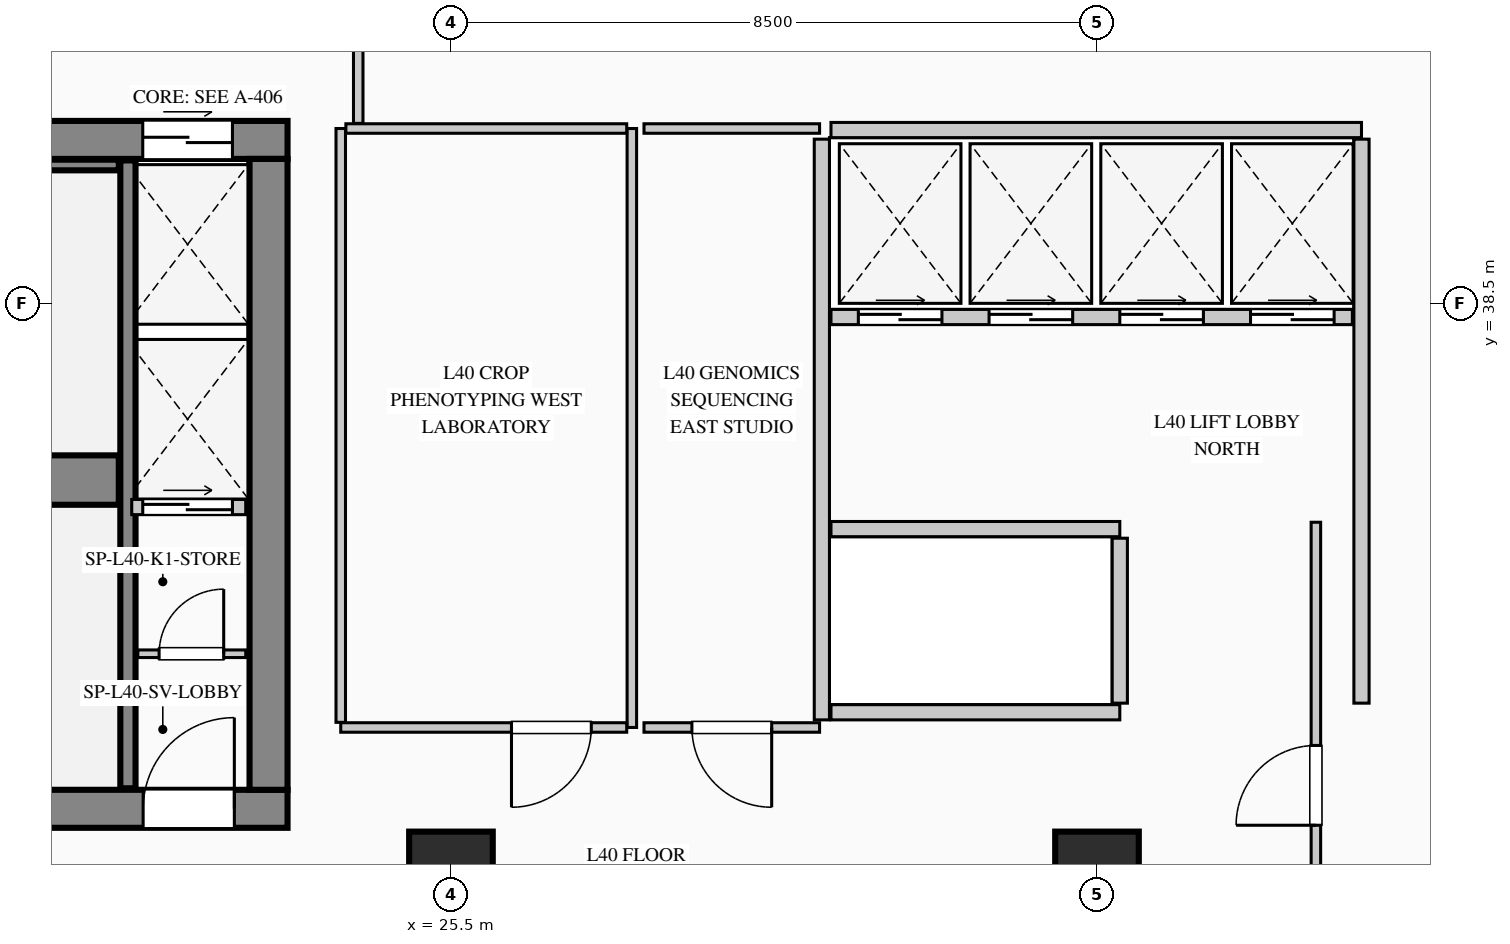
"""IFC4 building model, lengths in metres.
Left out: names, types, materials, properties, quantities, classifications, styles, units other than length and angle.
Written with IfcOpenShell. Run it as: python <this file> out.ifc"""

import sys

from ifc_helpers import new_model, si_unit, direction, frame, frame_2d, origin, origin_2d, place, context, subcontext, project, spatial, rectangle, extrude, element, fill, save


model = new_model("IFC4")
c1 = context("Model", 3, precision=1e-05, world=origin(), true_north=direction((0.0, 1.0)))
c2 = subcontext(c1, "Body", "Model", "MODEL_VIEW")
j1 = project(units=[si_unit("LENGTHUNIT", "METRE"), si_unit("PLANEANGLEUNIT", "RADIAN")], contexts=[c1])
p1 = place(None, origin())
s1 = spatial("IfcSite", under=j1, at=p1, CompositionType="ELEMENT")
p2 = place(p1, origin())
s2 = spatial("IfcBuilding", under=s1, at=p2, CompositionType="ELEMENT")
p3 = place(p2, frame((0.0, 0.0, 170.65)))
s3 = spatial("IfcBuildingStorey", under=s2, at=p3, CompositionType="ELEMENT", Elevation=170.65)
p4 = place(p3, frame((5.5, 40.65, 0.0), z_axis=(0.0, 0.0, 1.0), x_axis=(1.0, 0.0, 0.0)))
e1 = element("IfcWall", 1, at=p4, inside=s3, PredefinedType="SHEAR", context=c2, shape_type="SweptSolid", body=[
    extrude(rectangle(XDim=17.85, YDim=0.5, at=frame_2d((8.925, 0.0))), origin(), (0.0, 0.0, 1.0), 3.95),
])
p5 = place(p4, frame((15.945, 0.0, 0.0)))
e2 = element("IfcOpeningElement", 2, at=p5, cuts=e1, PredefinedType="OPENING", context=c2, shape_type="SweptSolid", body=[
    extrude(rectangle(XDim=1.18, YDim=2.25, at=frame_2d((0.59, 1.125))), frame((0.0, 0.26, 0.0), z_axis=(0.0, -1.0, 0.0), x_axis=(1.0, 0.0, 0.0)), (0.0, 0.0, 1.0), 0.52),
])
p6 = place(p3, frame((5.5, 31.85, 0.0), z_axis=(0.0, 0.0, 1.0), x_axis=(1.0, 0.0, 0.0)))
e3 = element("IfcWall", 3, at=p6, inside=s3, PredefinedType="SHEAR", context=c2, shape_type="SweptSolid", body=[
    extrude(rectangle(XDim=17.85, YDim=0.5, at=frame_2d((8.925, 0.0))), origin(), (0.0, 0.0, 1.0), 3.95),
])
p7 = place(p6, frame((3.15, 0.0, 0.0)))
e4 = element("IfcOpeningElement", 4, at=p7, cuts=e3, PredefinedType="OPENING", context=c2, shape_type="SweptSolid", body=[
    extrude(rectangle(XDim=1.2, YDim=2.2, at=frame_2d((0.6, 1.1))), frame((0.0, 0.26, 0.0), z_axis=(0.0, -1.0, 0.0), x_axis=(1.0, 0.0, 0.0)), (0.0, 0.0, 1.0), 0.52),
])
p8 = place(p6, frame((7.0, 0.0, 0.0)))
e5 = element("IfcOpeningElement", 5, at=p8, cuts=e3, PredefinedType="OPENING", context=c2, shape_type="SweptSolid", body=[
    extrude(rectangle(XDim=1.2, YDim=2.2, at=frame_2d((0.6, 1.1))), frame((0.0, 0.26, 0.0), z_axis=(0.0, -1.0, 0.0), x_axis=(1.0, 0.0, 0.0)), (0.0, 0.0, 1.0), 0.52),
])
p9 = place(p6, frame((8.85, 0.0, 0.0)))
e6 = element("IfcOpeningElement", 6, at=p9, cuts=e3, PredefinedType="OPENING", context=c2, shape_type="SweptSolid", body=[
    extrude(rectangle(XDim=1.15, YDim=2.2, at=frame_2d((0.575, 1.1))), frame((0.0, 0.26, 0.0), z_axis=(0.0, -1.0, 0.0), x_axis=(1.0, 0.0, 0.0)), (0.0, 0.0, 1.0), 0.52),
])
p10 = place(p6, frame((15.95, 0.0, 0.0)))
e7 = element("IfcOpeningElement", 7, at=p10, cuts=e3, PredefinedType="OPENING", context=c2, shape_type="SweptSolid", body=[
    extrude(rectangle(XDim=1.2, YDim=2.2, at=frame_2d((0.6, 1.1))), frame((0.0, 0.26, 0.0), z_axis=(0.0, -1.0, 0.0), x_axis=(1.0, 0.0, 0.0)), (0.0, 0.0, 1.0), 0.52),
])
p11 = place(p3, frame((23.1, 32.1, 0.0), z_axis=(0.0, 0.0, 1.0), x_axis=(0.0, 1.0, 0.0)))
e8 = element("IfcWall", 8, at=p11, inside=s3, PredefinedType="SHEAR", context=c2, shape_type="SweptSolid", body=[
    extrude(rectangle(XDim=8.3, YDim=0.5, at=frame_2d((4.15, 0.0))), origin(), (0.0, 0.0, 1.0), 3.95),
])
p12 = place(p3, frame((14.12, 36.175, 0.0), z_axis=(0.0, 0.0, 1.0), x_axis=(1.0, 0.0, 0.0)))
e9 = element("IfcWall", 9, at=p12, inside=s3, PredefinedType="SHEAR", context=c2, shape_type="SweptSolid", body=[
    extrude(rectangle(XDim=7.01, YDim=0.65, at=frame_2d((3.505, 0.0))), origin(), (0.0, 0.0, 1.0), 3.95),
])
p13 = place(p3, frame((21.25, 32.12, 0.0), z_axis=(0.0, 0.0, 1.0), x_axis=(0.0, 1.0, 0.0)))
e10 = element("IfcWall", 10, at=p13, inside=s3, PredefinedType="SHEAR", context=c2, shape_type="SweptSolid", body=[
    extrude(rectangle(XDim=8.26, YDim=0.2, at=frame_2d((4.13, 0.0))), origin(), (0.0, 0.0, 1.0), 3.95),
])
p14 = place(p3, frame((14.12, 40.32, 0.0), z_axis=(0.0, 0.0, 1.0), x_axis=(1.0, 0.0, 0.0)))
e11 = element("IfcWall", 11, at=p14, inside=s3, PredefinedType="SHEAR", context=c2, shape_type="SweptSolid", body=[
    extrude(rectangle(XDim=7.01, YDim=0.14, at=frame_2d((3.505, 0.0))), origin(), (0.0, 0.0, 1.0), 3.95),
])
for number, where, z_axis, x_axis in (
    (12, (25.5, 31.0, 0.0), (0.0, 0.0, 1.0), (1.0, 0.0, 0.0)),
    (13, (34.0, 31.0, 0.0), (0.0, 0.0, 1.0), (1.0, 0.0, 0.0)),
):
    element("IfcColumn", number, at=place(p3, frame(where, z_axis=z_axis, x_axis=x_axis)), inside=s3, PredefinedType="COLUMN", context=c2, shape_type="SweptSolid", body=[
        extrude(rectangle(XDim=1.1, YDim=1.1, at=origin_2d()), origin(), (0.0, 0.0, 1.0), 3.95),
    ])
p15 = place(p3, frame((21.38, 33.89, 0.0), z_axis=(0.0, 0.0, 1.0), x_axis=(1.0, 0.0, 0.0)))
e14 = element("IfcWall", 14, at=p15, inside=s3, PredefinedType="PARTITIONING", context=c2, shape_type="SweptSolid", body=[
    extrude(rectangle(XDim=1.42, YDim=0.1, at=frame_2d((0.71, 0.0))), origin(), (0.0, 0.0, 1.0), 3.69),
])
p16 = place(p15, frame((0.28, 0.0, 0.0)))
e15 = element("IfcOpeningElement", 15, at=p16, cuts=e14, PredefinedType="OPENING", context=c2, shape_type="SweptSolid", body=[
    extrude(rectangle(XDim=0.85, YDim=2.1, at=frame_2d((0.425, 1.05))), frame((0.0, 0.06, 0.0), z_axis=(0.0, -1.0, 0.0), x_axis=(1.0, 0.0, 0.0)), (0.0, 0.0, 1.0), 0.12),
])
p17 = place(p3, frame((21.3, 35.82, 0.0), z_axis=(0.0, 0.0, 1.0), x_axis=(1.0, 0.0, 0.0)))
e16 = element("IfcWall", 16, at=p17, inside=s3, PredefinedType="PARTITIONING", context=c2, shape_type="SweptSolid", body=[
    extrude(rectangle(XDim=1.5, YDim=0.2, at=frame_2d((0.75, 0.0))), origin(), (0.0, 0.0, 1.0), 3.69),
])
p18 = place(p17, frame((0.145, 0.0, 0.0)))
e17 = element("IfcOpeningElement", 17, at=p18, cuts=e16, PredefinedType="OPENING", context=c2, shape_type="SweptSolid", body=[
    extrude(rectangle(XDim=1.18, YDim=2.25, at=frame_2d((0.59, 1.125))), frame((0.0, 0.11, 0.0), z_axis=(0.0, -1.0, 0.0), x_axis=(1.0, 0.0, 0.0)), (0.0, 0.0, 1.0), 0.22),
])
p19 = place(p3, frame((30.38, 33.02, 0.0), z_axis=(0.0, 0.0, 1.0), x_axis=(0.0, 1.0, 0.0)))
e18 = element("IfcWall", 18, at=p19, inside=s3, PredefinedType="PARTITIONING", context=c2, shape_type="SweptSolid", body=[
    extrude(rectangle(XDim=7.64, YDim=0.2, at=frame_2d((3.82, 0.0))), origin(), (0.0, 0.0, 1.0), 3.69),
])
p20 = place(p3, frame((30.5, 40.78, 0.0), z_axis=(0.0, 0.0, 1.0), x_axis=(1.0, 0.0, 0.0)))
e19 = element("IfcWall", 19, at=p20, inside=s3, PredefinedType="PARTITIONING", context=c2, shape_type="SweptSolid", body=[
    extrude(rectangle(XDim=6.98, YDim=0.2, at=frame_2d((3.49, 0.0))), origin(), (0.0, 0.0, 1.0), 3.69),
])
p21 = place(p3, frame((37.48, 33.24, 0.0), z_axis=(0.0, 0.0, 1.0), x_axis=(0.0, 1.0, 0.0)))
e20 = element("IfcWall", 20, at=p21, inside=s3, PredefinedType="PARTITIONING", context=c2, shape_type="SweptSolid", body=[
    extrude(rectangle(XDim=7.42, YDim=0.2, at=frame_2d((3.71, 0.0))), origin(), (0.0, 0.0, 1.0), 3.69),
])
p22 = place(p3, frame((30.5, 38.32, 0.0), z_axis=(0.0, 0.0, 1.0), x_axis=(1.0, 0.0, 0.0)))
e21 = element("IfcWall", 21, at=p22, inside=s3, PredefinedType="PARTITIONING", context=c2, shape_type="SweptSolid", body=[
    extrude(rectangle(XDim=6.86, YDim=0.2, at=frame_2d((3.43, 0.0))), origin(), (0.0, 0.0, 1.0), 3.69),
])
p23 = place(p22, frame((0.36, 0.0, 0.0)))
e22 = element("IfcOpeningElement", 22, at=p23, cuts=e21, PredefinedType="OPENING", context=c2, shape_type="SweptSolid", body=[
    extrude(rectangle(XDim=1.1, YDim=2.2, at=frame_2d((0.55, 1.1))), frame((0.0, 0.11, 0.0), z_axis=(0.0, -1.0, 0.0), x_axis=(1.0, 0.0, 0.0)), (0.0, 0.0, 1.0), 0.22),
])
p24 = place(p22, frame((2.08, 0.0, 0.0)))
e23 = element("IfcOpeningElement", 23, at=p24, cuts=e21, PredefinedType="OPENING", context=c2, shape_type="SweptSolid", body=[
    extrude(rectangle(XDim=1.1, YDim=2.2, at=frame_2d((0.55, 1.1))), frame((0.0, 0.11, 0.0), z_axis=(0.0, -1.0, 0.0), x_axis=(1.0, 0.0, 0.0)), (0.0, 0.0, 1.0), 0.22),
])
p25 = place(p22, frame((3.8, 0.0, 0.0)))
e24 = element("IfcOpeningElement", 24, at=p25, cuts=e21, PredefinedType="OPENING", context=c2, shape_type="SweptSolid", body=[
    extrude(rectangle(XDim=1.1, YDim=2.2, at=frame_2d((0.55, 1.1))), frame((0.0, 0.11, 0.0), z_axis=(0.0, -1.0, 0.0), x_axis=(1.0, 0.0, 0.0)), (0.0, 0.0, 1.0), 0.22),
])
p26 = place(p22, frame((5.52, 0.0, 0.0)))
e25 = element("IfcOpeningElement", 25, at=p26, cuts=e21, PredefinedType="OPENING", context=c2, shape_type="SweptSolid", body=[
    extrude(rectangle(XDim=1.1, YDim=2.2, at=frame_2d((0.55, 1.1))), frame((0.0, 0.11, 0.0), z_axis=(0.0, -1.0, 0.0), x_axis=(1.0, 0.0, 0.0)), (0.0, 0.0, 1.0), 0.22),
])
for number, where, z_axis, x_axis in (
    (26, (30.5, 35.53, 0.0), (0.0, 0.0, 1.0), (1.0, 0.0, 0.0)),
    (27, (30.5, 33.12, 0.0), (0.0, 0.0, 1.0), (1.0, 0.0, 0.0)),
):
    element("IfcWall", number, at=place(p3, frame(where, z_axis=z_axis, x_axis=x_axis)), inside=s3, PredefinedType="PARTITIONING", context=c2, shape_type="SweptSolid", body=[
        extrude(rectangle(XDim=3.8, YDim=0.2, at=frame_2d((1.9, 0.0))), origin(), (0.0, 0.0, 1.0), 3.69),
    ])
p27 = place(p3, frame((34.3, 33.24, 0.0), z_axis=(0.0, 0.0, 1.0), x_axis=(0.0, 1.0, 0.0)))
e28 = element("IfcWall", 28, at=p27, inside=s3, PredefinedType="PARTITIONING", context=c2, shape_type="SweptSolid", body=[
    extrude(rectangle(XDim=2.17, YDim=0.2, at=frame_2d((1.085, 0.0))), origin(), (0.0, 0.0, 1.0), 3.69),
])
p28 = place(p3, frame((27.88, 40.8, 0.0), z_axis=(0.0, 0.0, 1.0), x_axis=(0.0, -1.0, 0.0)))
e29 = element("IfcWall", 29, at=p28, inside=s3, PredefinedType="PARTITIONING", context=c2, shape_type="SweptSolid", body=[
    extrude(rectangle(XDim=7.88, YDim=0.125, at=frame_2d((3.94, 0.0))), origin(), (0.0, 0.0, 1.0), 3.69),
])
p29 = place(p3, frame((27.812, 32.92, 0.0), z_axis=(0.0, 0.0, 1.0), x_axis=(-1.0, 0.0, 0.0)))
e30 = element("IfcWall", 30, at=p29, inside=s3, PredefinedType="PARTITIONING", context=c2, shape_type="SweptSolid", body=[
    extrude(rectangle(XDim=3.762, YDim=0.125, at=frame_2d((1.881, 0.0))), origin(), (0.0, 0.0, 1.0), 3.69),
])
p30 = place(p29, frame((0.466, 0.0, 0.0)))
e31 = element("IfcOpeningElement", 31, at=p30, cuts=e30, PredefinedType="OPENING", context=c2, shape_type="SweptSolid", body=[
    extrude(rectangle(XDim=1.05, YDim=2.15, at=frame_2d((0.525, 1.075))), frame((0.0, 0.073, 0.0), z_axis=(0.0, -1.0, 0.0), x_axis=(1.0, 0.0, 0.0)), (0.0, 0.0, 1.0), 0.145),
])
p31 = place(p3, frame((24.05, 32.988, 0.0), z_axis=(0.0, 0.0, 1.0), x_axis=(0.0, 1.0, 0.0)))
e32 = element("IfcWall", 32, at=p31, inside=s3, PredefinedType="PARTITIONING", context=c2, shape_type="SweptSolid", body=[
    extrude(rectangle(XDim=7.812, YDim=0.125, at=frame_2d((3.906, 0.0))), origin(), (0.0, 0.0, 1.0), 3.69),
])
p32 = place(p3, frame((24.117, 40.8, 0.0), z_axis=(0.0, 0.0, 1.0), x_axis=(1.0, 0.0, 0.0)))
e33 = element("IfcWall", 33, at=p32, inside=s3, PredefinedType="PARTITIONING", context=c2, shape_type="SweptSolid", body=[
    extrude(rectangle(XDim=3.695, YDim=0.125, at=frame_2d((1.848, 0.0))), origin(), (0.0, 0.0, 1.0), 3.69),
])
p33 = place(p3, frame((30.35, 32.92, 0.0), z_axis=(0.0, 0.0, 1.0), x_axis=(-1.0, 0.0, 0.0)))
e34 = element("IfcWall", 34, at=p33, inside=s3, PredefinedType="PARTITIONING", context=c2, shape_type="SweptSolid", body=[
    extrude(rectangle(XDim=2.31, YDim=0.125, at=frame_2d((1.155, 0.0))), origin(), (0.0, 0.0, 1.0), 3.69),
])
p34 = place(p33, frame((0.63, 0.0, 0.0)))
e35 = element("IfcOpeningElement", 35, at=p34, cuts=e34, PredefinedType="OPENING", context=c2, shape_type="SweptSolid", body=[
    extrude(rectangle(XDim=1.05, YDim=2.15, at=frame_2d((0.525, 1.075))), frame((0.0, 0.073, 0.0), z_axis=(0.0, -1.0, 0.0), x_axis=(1.0, 0.0, 0.0)), (0.0, 0.0, 1.0), 0.145),
])
p35 = place(p3, frame((28.04, 40.8, 0.0), z_axis=(0.0, 0.0, 1.0), x_axis=(1.0, 0.0, 0.0)))
e36 = element("IfcWall", 36, at=p35, inside=s3, PredefinedType="PARTITIONING", context=c2, shape_type="SweptSolid", body=[
    extrude(rectangle(XDim=2.31, YDim=0.125, at=frame_2d((1.155, 0.0))), origin(), (0.0, 0.0, 1.0), 3.69),
])
p36 = place(p3, frame((36.88, 28.698, 0.0), z_axis=(0.0, 0.0, 1.0), x_axis=(0.0, 1.0, 0.0)))
e37 = element("IfcWall", 37, at=p36, inside=s3, PredefinedType="PARTITIONING", context=c2, shape_type="SweptSolid", body=[
    extrude(rectangle(XDim=6.923, YDim=0.125, at=frame_2d((3.461, 0.0))), origin(), (0.0, 0.0, 1.0), 3.69),
])
p37 = place(p36, frame((2.936, 0.0, 0.0)))
e38 = element("IfcOpeningElement", 38, at=p37, cuts=e37, PredefinedType="OPENING", context=c2, shape_type="SweptSolid", body=[
    extrude(rectangle(XDim=1.05, YDim=2.15, at=frame_2d((0.525, 1.075))), frame((0.0, 0.073, 0.0), z_axis=(0.0, -1.0, 0.0), x_axis=(1.0, 0.0, 0.0)), (0.0, 0.0, 1.0), 0.145),
])
p38 = place(p3, frame((24.28, 40.867, 0.0), z_axis=(0.0, 0.0, 1.0), x_axis=(0.0, 1.0, 0.0)))
e39 = element("IfcWall", 39, at=p38, inside=s3, PredefinedType="PARTITIONING", context=c2, shape_type="SweptSolid", body=[
    extrude(rectangle(XDim=2.397, YDim=0.125, at=frame_2d((1.199, 0.0))), origin(), (0.0, 0.0, 1.0), 3.69),
])
p39 = place(p10, origin())
e40 = element("IfcDoor", 40, at=p39, inside=s3, OperationType="SINGLE_SWING_RIGHT", PredefinedType="DOOR", context=c2, shape_type="SweptSolid", body=[
    extrude(rectangle(XDim=1.2, YDim=2.2, at=frame_2d((0.6, 1.1))), frame((0.0, 0.025, 0.0), z_axis=(0.0, -1.0, 0.0), x_axis=(1.0, 0.0, 0.0)), (0.0, 0.0, 1.0), 0.05),
])
fill(e7, e40)
p40 = place(p16, origin())
e41 = element("IfcDoor", 41, at=p40, inside=s3, OperationType="SINGLE_SWING_RIGHT", PredefinedType="DOOR", context=c2, shape_type="SweptSolid", body=[
    extrude(rectangle(XDim=0.85, YDim=2.1, at=frame_2d((0.425, 1.05))), frame((0.0, 0.025, 0.0), z_axis=(0.0, -1.0, 0.0), x_axis=(1.0, 0.0, 0.0)), (0.0, 0.0, 1.0), 0.05),
])
fill(e15, e41)
p41 = place(p5, origin())
e42 = element("IfcDoor", 42, at=p41, inside=s3, OperationType="DOUBLE_DOOR_SLIDING", PredefinedType="DOOR", context=c2, shape_type="SweptSolid", body=[
    extrude(rectangle(XDim=1.18, YDim=2.25, at=frame_2d((0.59, 1.125))), frame((0.0, 0.025, 0.0), z_axis=(0.0, -1.0, 0.0), x_axis=(1.0, 0.0, 0.0)), (0.0, 0.0, 1.0), 0.05),
])
fill(e2, e42)
p42 = place(p18, origin())
e43 = element("IfcDoor", 43, at=p42, inside=s3, OperationType="DOUBLE_DOOR_SLIDING", PredefinedType="DOOR", context=c2, shape_type="SweptSolid", body=[
    extrude(rectangle(XDim=1.18, YDim=2.25, at=frame_2d((0.59, 1.125))), frame((0.0, 0.025, 0.0), z_axis=(0.0, -1.0, 0.0), x_axis=(1.0, 0.0, 0.0)), (0.0, 0.0, 1.0), 0.05),
])
fill(e17, e43)
p43 = place(p23, origin())
e44 = element("IfcDoor", 44, at=p43, inside=s3, OperationType="DOUBLE_DOOR_SLIDING", PredefinedType="DOOR", context=c2, shape_type="SweptSolid", body=[
    extrude(rectangle(XDim=1.1, YDim=2.2, at=frame_2d((0.55, 1.1))), frame((0.0, 0.025, 0.0), z_axis=(0.0, -1.0, 0.0), x_axis=(1.0, 0.0, 0.0)), (0.0, 0.0, 1.0), 0.05),
])
fill(e22, e44)
p44 = place(p24, origin())
e45 = element("IfcDoor", 45, at=p44, inside=s3, OperationType="DOUBLE_DOOR_SLIDING", PredefinedType="DOOR", context=c2, shape_type="SweptSolid", body=[
    extrude(rectangle(XDim=1.1, YDim=2.2, at=frame_2d((0.55, 1.1))), frame((0.0, 0.025, 0.0), z_axis=(0.0, -1.0, 0.0), x_axis=(1.0, 0.0, 0.0)), (0.0, 0.0, 1.0), 0.05),
])
fill(e23, e45)
p45 = place(p25, origin())
e46 = element("IfcDoor", 46, at=p45, inside=s3, OperationType="DOUBLE_DOOR_SLIDING", PredefinedType="DOOR", context=c2, shape_type="SweptSolid", body=[
    extrude(rectangle(XDim=1.1, YDim=2.2, at=frame_2d((0.55, 1.1))), frame((0.0, 0.025, 0.0), z_axis=(0.0, -1.0, 0.0), x_axis=(1.0, 0.0, 0.0)), (0.0, 0.0, 1.0), 0.05),
])
fill(e24, e46)
p46 = place(p26, origin())
e47 = element("IfcDoor", 47, at=p46, inside=s3, OperationType="DOUBLE_DOOR_SLIDING", PredefinedType="DOOR", context=c2, shape_type="SweptSolid", body=[
    extrude(rectangle(XDim=1.1, YDim=2.2, at=frame_2d((0.55, 1.1))), frame((0.0, 0.025, 0.0), z_axis=(0.0, -1.0, 0.0), x_axis=(1.0, 0.0, 0.0)), (0.0, 0.0, 1.0), 0.05),
])
fill(e25, e47)
p47 = place(p30, origin())
e48 = element("IfcDoor", 48, at=p47, inside=s3, OperationType="SINGLE_SWING_RIGHT", PredefinedType="DOOR", context=c2, shape_type="SweptSolid", body=[
    extrude(rectangle(XDim=1.05, YDim=2.15, at=frame_2d((0.525, 1.075))), frame((0.0, 0.025, 0.0), z_axis=(0.0, -1.0, 0.0), x_axis=(1.0, 0.0, 0.0)), (0.0, 0.0, 1.0), 0.05),
])
fill(e31, e48)
p48 = place(p34, origin())
e49 = element("IfcDoor", 49, at=p48, inside=s3, OperationType="SINGLE_SWING_LEFT", PredefinedType="DOOR", context=c2, shape_type="SweptSolid", body=[
    extrude(rectangle(XDim=1.05, YDim=2.15, at=frame_2d((0.525, 1.075))), frame((0.0, 0.025, 0.0), z_axis=(0.0, -1.0, 0.0), x_axis=(1.0, 0.0, 0.0)), (0.0, 0.0, 1.0), 0.05),
])
fill(e35, e49)
p49 = place(p37, origin())
e50 = element("IfcDoor", 50, at=p49, inside=s3, OperationType="SINGLE_SWING_LEFT", PredefinedType="DOOR", context=c2, shape_type="SweptSolid", body=[
    extrude(rectangle(XDim=1.05, YDim=2.15, at=frame_2d((0.525, 1.075))), frame((0.0, 0.025, 0.0), z_axis=(0.0, -1.0, 0.0), x_axis=(1.0, 0.0, 0.0)), (0.0, 0.0, 1.0), 0.05),
])
fill(e38, e50)
save(model, sys.argv[1])
